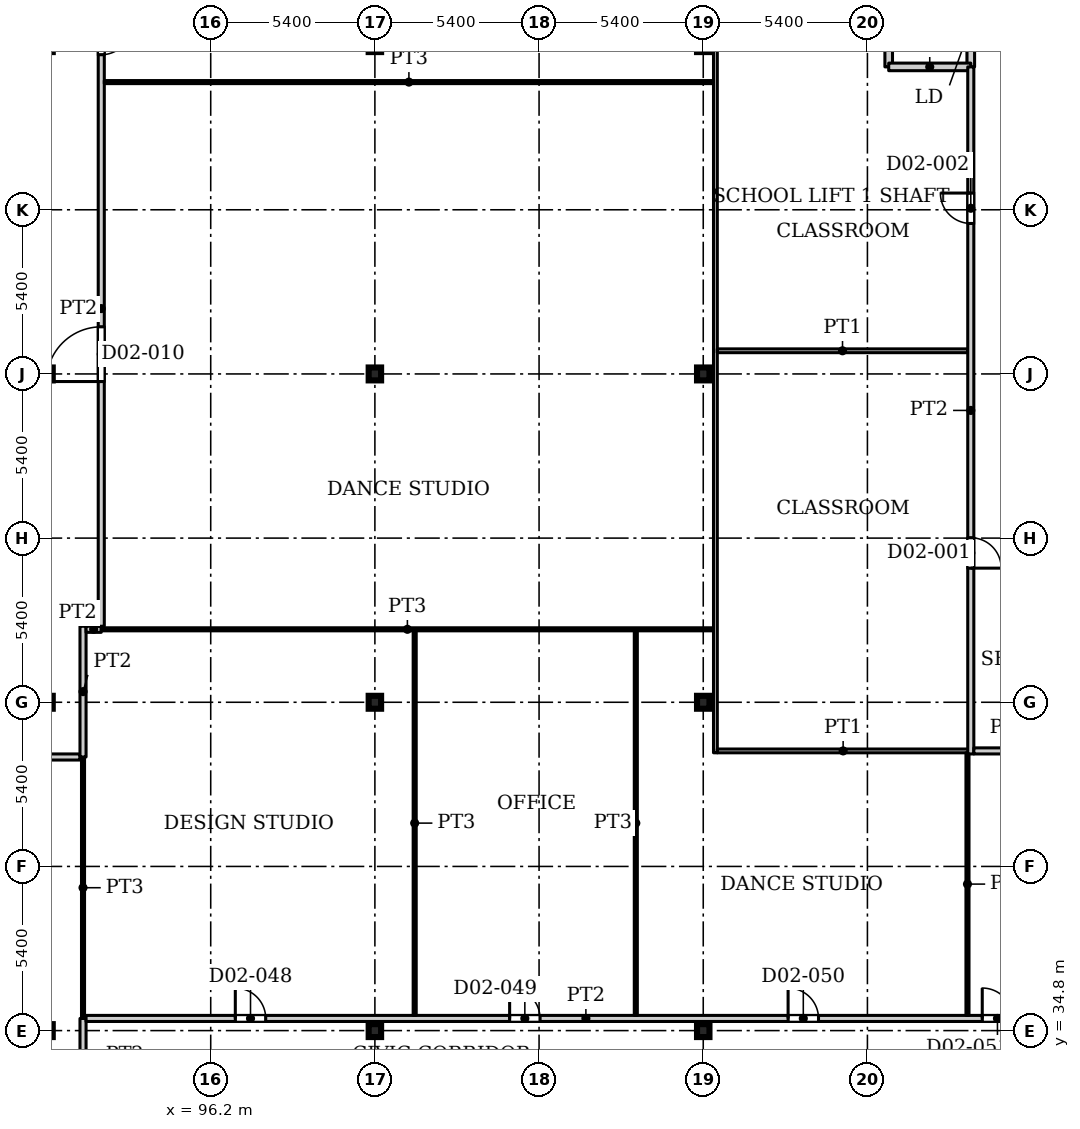
"""IFC4 building model, lengths in metres.
Left out: names, types, materials, properties, quantities, classifications, styles, units other than length and angle.
Written with IfcOpenShell. Run it as: python <this file> out.ifc"""

import sys

from ifc_helpers import new_model, si_unit, direction, frame, frame_2d, origin, origin_2d, place, context, subcontext, project, spatial, rectangle, i_section, extrude, source, transform, mapped, element, fill, save


model = new_model("IFC4")
c1 = context("Model", 3, precision=1e-05, world=origin(), true_north=direction((0.0, 1.0)))
c2 = subcontext(c1, "Body", "Model", "MODEL_VIEW")
j1 = project(units=[si_unit("LENGTHUNIT", "METRE"), si_unit("PLANEANGLEUNIT", "RADIAN")], contexts=[c1])
p1 = place(None, origin())
s1 = spatial("IfcSite", under=j1, at=p1, CompositionType="ELEMENT")
p2 = place(p1, origin())
s2 = spatial("IfcBuilding", under=s1, at=p2, CompositionType="ELEMENT")
p3 = place(p2, frame((0.0, 0.0, 12.5)))
s3 = spatial("IfcBuildingStorey", under=s2, at=p3, CompositionType="ELEMENT", Elevation=12.5)
for number, where, z_axis, x_axis in (
    (1, (90.8, 34.8, 0.0), (0.0, 0.0, 1.0), (1.0, 0.0, 0.0)),
    (2, (101.6, 34.8, 0.0), (0.0, 0.0, 1.0), (1.0, 0.0, 0.0)),
    (3, (112.4, 34.8, 0.0), (0.0, 0.0, 1.0), (1.0, 0.0, 0.0)),
    (4, (90.8, 45.6, 0.0), (0.0, 0.0, 1.0), (1.0, 0.0, 0.0)),
    (5, (101.6, 45.6, 0.0), (0.0, 0.0, 1.0), (1.0, 0.0, 0.0)),
    (6, (112.4, 45.6, 0.0), (0.0, 0.0, 1.0), (1.0, 0.0, 0.0)),
    (7, (90.8, 56.4, 0.0), (0.0, 0.0, 1.0), (1.0, 0.0, 0.0)),
    (8, (101.6, 56.4, 0.0), (0.0, 0.0, 1.0), (1.0, 0.0, 0.0)),
    (9, (112.4, 56.4, 0.0), (0.0, 0.0, 1.0), (1.0, 0.0, 0.0)),
    (10, (90.8, 67.2, 0.0), (0.0, 0.0, 1.0), (1.0, 0.0, 0.0)),
    (11, (101.6, 67.2, 0.0), (0.0, 0.0, 1.0), (1.0, 0.0, 0.0)),
    (12, (112.4, 67.2, 0.0), (0.0, 0.0, 1.0), (1.0, 0.0, 0.0)),
):
    element("IfcColumn", number, at=place(p3, frame(where, z_axis=z_axis, x_axis=x_axis)), inside=s3, PredefinedType="COLUMN", context=c2, shape_type="SweptSolid", body=[
        extrude(i_section(OverallWidth=0.409, OverallDepth=0.425, WebThickness=0.033, FlangeThickness=0.052, FilletRadius=0.013, at=origin_2d()), origin(), (0.0, 0.0, 1.0), 4.5),
    ])
p4 = place(p3, frame((118.5, 66.5, 0.0), z_axis=(0.0, 0.0, 1.0), x_axis=(0.0, 1.0, 0.0)))
e13 = element("IfcWall", 13, at=p4, inside=s3, PredefinedType="PARTITIONING", context=c2, shape_type="SweptSolid", body=[
    extrude(rectangle(XDim=8.1, YDim=0.25, at=frame_2d((4.05, 0.0))), origin(), (0.0, 0.0, 1.0), 4.5),
])
p5 = place(p3, frame((121.2, 66.5, 0.0), z_axis=(0.0, 0.0, 1.0), x_axis=(0.0, 1.0, 0.0)))
e14 = element("IfcWall", 14, at=p5, inside=s3, PredefinedType="PARTITIONING", context=c2, shape_type="SweptSolid", body=[
    extrude(rectangle(XDim=8.1, YDim=0.25, at=frame_2d((4.05, 0.0))), origin(), (0.0, 0.0, 1.0), 4.5),
])
p6 = place(p5, frame((0.8, 0.0, 0.0)))
e15 = element("IfcOpeningElement", 15, at=p6, cuts=e14, PredefinedType="OPENING", context=c2, shape_type="SweptSolid", body=[
    extrude(rectangle(XDim=1.1, YDim=2.2, at=frame_2d((0.55, 1.1))), frame((0.0, 0.135, 0.0), z_axis=(0.0, -1.0, 0.0), x_axis=(1.0, 0.0, 0.0)), (0.0, 0.0, 1.0), 0.27),
])
p7 = place(p5, frame((3.5, 0.0, 0.0)))
e16 = element("IfcOpeningElement", 16, at=p7, cuts=e14, PredefinedType="OPENING", context=c2, shape_type="SweptSolid", body=[
    extrude(rectangle(XDim=1.1, YDim=2.2, at=frame_2d((0.55, 1.1))), frame((0.0, 0.135, 0.0), z_axis=(0.0, -1.0, 0.0), x_axis=(1.0, 0.0, 0.0)), (0.0, 0.0, 1.0), 0.27),
])
p8 = place(p5, frame((6.2, 0.0, 0.0)))
e17 = element("IfcOpeningElement", 17, at=p8, cuts=e14, PredefinedType="OPENING", context=c2, shape_type="SweptSolid", body=[
    extrude(rectangle(XDim=1.1, YDim=2.2, at=frame_2d((0.55, 1.1))), frame((0.0, 0.135, 0.0), z_axis=(0.0, -1.0, 0.0), x_axis=(1.0, 0.0, 0.0)), (0.0, 0.0, 1.0), 0.27),
])
p9 = place(p3, frame((118.5, 66.5, 0.0), z_axis=(0.0, 0.0, 1.0), x_axis=(1.0, 0.0, 0.0)))
e18 = element("IfcWall", 18, at=p9, inside=s3, PredefinedType="PARTITIONING", context=c2, shape_type="SweptSolid", body=[
    extrude(rectangle(XDim=2.7, YDim=0.25, at=frame_2d((1.35, 0.0))), origin(), (0.0, 0.0, 1.0), 4.5),
])
p10 = place(p3, frame((67.5, 43.8, 0.0), z_axis=(0.0, 0.0, 1.0), x_axis=(1.0, 0.0, 0.0)))
e19 = element("IfcWall", 19, at=p10, inside=s3, PredefinedType="PARTITIONING", context=c2, shape_type="SweptSolid", body=[
    extrude(rectangle(XDim=24.4, YDim=0.2, at=frame_2d((12.2, 0.0))), origin(), (0.0, 0.0, 1.0), 4.18),
])
p11 = place(p10, frame((11.3, 0.0, 0.0)))
e20 = element("IfcOpeningElement", 20, at=p11, cuts=e19, PredefinedType="OPENING", context=c2, shape_type="SweptSolid", body=[
    extrude(rectangle(XDim=1.8, YDim=2.1, at=frame_2d((0.9, 1.05))), frame((0.0, 0.11, 0.0), z_axis=(0.0, -1.0, 0.0), x_axis=(1.0, 0.0, 0.0)), (0.0, 0.0, 1.0), 0.22),
])
p12 = place(p3, frame((92.0, 32.8, 0.0), z_axis=(0.0, 0.0, 1.0), x_axis=(0.0, 1.0, 0.0)))
e21 = element("IfcWall", 21, at=p12, inside=s3, PredefinedType="PARTITIONING", context=c2, shape_type="SweptSolid", body=[
    extrude(rectangle(XDim=2.4, YDim=0.2, at=frame_2d((1.2, 0.0))), origin(), (0.0, 0.0, 1.0), 4.18),
])
p13 = place(p3, frame((92.0, 35.2, 0.0), z_axis=(0.0, 0.0, 1.0), x_axis=(0.0, 1.0, 0.0)))
e22 = element("IfcWall", 22, at=p13, inside=s3, PredefinedType="PARTITIONING", context=c2, shape_type="SweptSolid", body=[
    extrude(rectangle(XDim=8.6, YDim=0.1, at=frame_2d((4.3, 0.0))), origin(), (0.0, 0.0, 1.0), 4.18),
])
p14 = place(p3, frame((92.0, 43.8, 0.0), z_axis=(0.0, 0.0, 1.0), x_axis=(0.0, 1.0, 0.0)))
e23 = element("IfcWall", 23, at=p14, inside=s3, PredefinedType="PARTITIONING", context=c2, shape_type="SweptSolid", body=[
    extrude(rectangle(XDim=4.3, YDim=0.2, at=frame_2d((2.15, 0.0))), origin(), (0.0, 0.0, 1.0), 4.18),
])
p15 = place(p3, frame((92.1, 35.2, 0.0), z_axis=(0.0, 0.0, 1.0), x_axis=(1.0, 0.0, 0.0)))
e24 = element("IfcWall", 24, at=p15, inside=s3, PredefinedType="PARTITIONING", context=c2, shape_type="SweptSolid", body=[
    extrude(rectangle(XDim=32.88, YDim=0.2, at=frame_2d((16.44, 0.0))), origin(), (0.0, 0.0, 1.0), 4.18),
])
p16 = place(p15, frame((4.909, 0.0, 0.0)))
e25 = element("IfcOpeningElement", 25, at=p16, cuts=e24, PredefinedType="OPENING", context=c2, shape_type="SweptSolid", body=[
    extrude(rectangle(XDim=1.0, YDim=2.1, at=frame_2d((0.5, 1.05))), frame((0.0, 0.11, 0.0), z_axis=(0.0, -1.0, 0.0), x_axis=(1.0, 0.0, 0.0)), (0.0, 0.0, 1.0), 0.22),
])
p17 = place(p15, frame((13.932, 0.0, 0.0)))
e26 = element("IfcOpeningElement", 26, at=p17, cuts=e24, PredefinedType="OPENING", context=c2, shape_type="SweptSolid", body=[
    extrude(rectangle(XDim=1.0, YDim=2.1, at=frame_2d((0.5, 1.05))), frame((0.0, 0.11, 0.0), z_axis=(0.0, -1.0, 0.0), x_axis=(1.0, 0.0, 0.0)), (0.0, 0.0, 1.0), 0.22),
])
p18 = place(p15, frame((23.091, 0.0, 0.0)))
e27 = element("IfcOpeningElement", 27, at=p18, cuts=e24, PredefinedType="OPENING", context=c2, shape_type="SweptSolid", body=[
    extrude(rectangle(XDim=1.0, YDim=2.1, at=frame_2d((0.5, 1.05))), frame((0.0, 0.11, 0.0), z_axis=(0.0, -1.0, 0.0), x_axis=(1.0, 0.0, 0.0)), (0.0, 0.0, 1.0), 0.22),
])
p19 = place(p15, frame((29.477, 0.0, 0.0)))
e28 = element("IfcOpeningElement", 28, at=p19, cuts=e24, PredefinedType="OPENING", context=c2, shape_type="SweptSolid", body=[
    extrude(rectangle(XDim=1.0, YDim=2.1, at=frame_2d((0.5, 1.05))), frame((0.0, 0.11, 0.0), z_axis=(0.0, -1.0, 0.0), x_axis=(1.0, 0.0, 0.0)), (0.0, 0.0, 1.0), 0.22),
])
p20 = place(p3, frame((92.1, 48.0, 0.0), z_axis=(0.0, 0.0, 1.0), x_axis=(1.0, 0.0, 0.0)))
e29 = element("IfcWall", 29, at=p20, inside=s3, PredefinedType="PARTITIONING", context=c2, shape_type="SweptSolid", body=[
    extrude(rectangle(XDim=0.5, YDim=0.2, at=frame_2d((0.25, 0.0))), origin(), (0.0, 0.0, 1.0), 4.18),
])
p21 = place(p3, frame((92.6, 48.0, 0.0), z_axis=(0.0, 0.0, 1.0), x_axis=(1.0, 0.0, 0.0)))
e30 = element("IfcWall", 30, at=p21, inside=s3, PredefinedType="PARTITIONING", context=c2, shape_type="SweptSolid", body=[
    extrude(rectangle(XDim=20.138, YDim=0.1, at=frame_2d((10.069, 0.0))), origin(), (0.0, 0.0, 1.0), 4.18),
])
p22 = place(p3, frame((92.6, 48.1, 0.0), z_axis=(0.0, 0.0, 1.0), x_axis=(0.0, 1.0, 0.0)))
e31 = element("IfcWall", 31, at=p22, inside=s3, PredefinedType="PARTITIONING", context=c2, shape_type="SweptSolid", body=[
    extrude(rectangle(XDim=20.9, YDim=0.2, at=frame_2d((10.45, 0.0))), origin(), (0.0, 0.0, 1.0), 4.18),
])
p23 = place(p22, frame((8.05, 0.0, 0.0)))
e32 = element("IfcOpeningElement", 32, at=p23, cuts=e31, PredefinedType="OPENING", context=c2, shape_type="SweptSolid", body=[
    extrude(rectangle(XDim=1.8, YDim=2.1, at=frame_2d((0.9, 1.05))), frame((0.0, 0.11, 0.0), z_axis=(0.0, -1.0, 0.0), x_axis=(1.0, 0.0, 0.0)), (0.0, 0.0, 1.0), 0.22),
])
p24 = place(p22, frame((18.8, 0.0, 0.0)))
e33 = element("IfcOpeningElement", 33, at=p24, cuts=e31, PredefinedType="OPENING", context=c2, shape_type="SweptSolid", body=[
    extrude(rectangle(XDim=1.0, YDim=2.1, at=frame_2d((0.5, 1.05))), frame((0.0, 0.11, 0.0), z_axis=(0.0, -1.0, 0.0), x_axis=(1.0, 0.0, 0.0)), (0.0, 0.0, 1.0), 0.22),
])
p25 = place(p3, frame((92.7, 66.0, 0.0), z_axis=(0.0, 0.0, 1.0), x_axis=(1.0, 0.0, 0.0)))
e34 = element("IfcWall", 34, at=p25, inside=s3, PredefinedType="PARTITIONING", context=c2, shape_type="SweptSolid", body=[
    extrude(rectangle(XDim=20.038, YDim=0.1, at=frame_2d((10.019, 0.0))), origin(), (0.0, 0.0, 1.0), 4.18),
])
for number, where, z_axis, x_axis in (
    (35, (102.909, 35.3, 0.0), (0.0, 0.0, 1.0), (0.0, 1.0, 0.0)),
    (36, (110.182, 35.3, 0.0), (0.0, 0.0, 1.0), (0.0, 1.0, 0.0)),
):
    element("IfcWall", number, at=place(p3, frame(where, z_axis=z_axis, x_axis=x_axis)), inside=s3, PredefinedType="PARTITIONING", context=c2, shape_type="SweptSolid", body=[
        extrude(rectangle(XDim=12.65, YDim=0.1, at=frame_2d((6.325, 0.0))), origin(), (0.0, 0.0, 1.0), 4.18),
    ])
p26 = place(p3, frame((112.8, 43.938, 0.0), z_axis=(0.0, 0.0, 1.0), x_axis=(0.0, 1.0, 0.0)))
e37 = element("IfcWall", 37, at=p26, inside=s3, PredefinedType="PARTITIONING", context=c2, shape_type="SweptSolid", body=[
    extrude(rectangle(XDim=46.787, YDim=0.125, at=frame_2d((23.394, 0.0))), origin(), (0.0, 0.0, 1.0), 4.18),
])
p27 = place(p3, frame((112.862, 44.0, 0.0), z_axis=(0.0, 0.0, 1.0), x_axis=(1.0, 0.0, 0.0)))
e38 = element("IfcWall", 38, at=p27, inside=s3, PredefinedType="PARTITIONING", context=c2, shape_type="SweptSolid", body=[
    extrude(rectangle(XDim=8.279, YDim=0.125, at=frame_2d((4.14, 0.0))), origin(), (0.0, 0.0, 1.0), 4.18),
])
p28 = place(p3, frame((112.862, 57.162, 0.0), z_axis=(0.0, 0.0, 1.0), x_axis=(1.0, 0.0, 0.0)))
e39 = element("IfcWall", 39, at=p28, inside=s3, PredefinedType="PARTITIONING", context=c2, shape_type="SweptSolid", body=[
    extrude(rectangle(XDim=8.238, YDim=0.125, at=frame_2d((4.119, 0.0))), origin(), (0.0, 0.0, 1.0), 4.18),
])
p29 = place(p3, frame((121.091, 35.3, 0.0), z_axis=(0.0, 0.0, 1.0), x_axis=(0.0, 1.0, 0.0)))
e40 = element("IfcWall", 40, at=p29, inside=s3, PredefinedType="PARTITIONING", context=c2, shape_type="SweptSolid", body=[
    extrude(rectangle(XDim=8.638, YDim=0.1, at=frame_2d((4.319, 0.0))), origin(), (0.0, 0.0, 1.0), 4.18),
])
p30 = place(p3, frame((121.2, 43.9, 0.0), z_axis=(0.0, 0.0, 1.0), x_axis=(0.0, 1.0, 0.0)))
e41 = element("IfcWall", 41, at=p30, inside=s3, PredefinedType="PARTITIONING", context=c2, shape_type="SweptSolid", body=[
    extrude(rectangle(XDim=22.6, YDim=0.2, at=frame_2d((11.3, 0.0))), origin(), (0.0, 0.0, 1.0), 4.18),
])
p31 = place(p30, frame((6.112, 0.0, 0.0)))
e42 = element("IfcOpeningElement", 42, at=p31, cuts=e41, PredefinedType="OPENING", context=c2, shape_type="SweptSolid", body=[
    extrude(rectangle(XDim=1.0, YDim=2.1, at=frame_2d((0.5, 1.05))), frame((0.0, 0.11, 0.0), z_axis=(0.0, -1.0, 0.0), x_axis=(1.0, 0.0, 0.0)), (0.0, 0.0, 1.0), 0.22),
])
p32 = place(p30, frame((17.45, 0.0, 0.0)))
e43 = element("IfcOpeningElement", 43, at=p32, cuts=e41, PredefinedType="OPENING", context=c2, shape_type="SweptSolid", body=[
    extrude(rectangle(XDim=1.0, YDim=2.1, at=frame_2d((0.5, 1.05))), frame((0.0, 0.11, 0.0), z_axis=(0.0, -1.0, 0.0), x_axis=(1.0, 0.0, 0.0)), (0.0, 0.0, 1.0), 0.22),
])
p33 = place(p3, frame((121.3, 44.0, 0.0), z_axis=(0.0, 0.0, 1.0), x_axis=(1.0, 0.0, 0.0)))
e44 = element("IfcWall", 44, at=p33, inside=s3, PredefinedType="PARTITIONING", context=c2, shape_type="SweptSolid", body=[
    extrude(rectangle(XDim=2.3, YDim=0.2, at=frame_2d((1.15, 0.0))), origin(), (0.0, 0.0, 1.0), 4.18),
])
m1 = source(origin(), c2, "Body", "SweptSolid", [
    extrude(rectangle(XDim=1.0, YDim=2.1, at=frame_2d((0.5, 1.05))), frame((0.0, 0.025, 0.0), z_axis=(0.0, -1.0, 0.0), x_axis=(1.0, 0.0, 0.0)), (0.0, 0.0, 1.0), 0.05),
])
p34 = place(p31, origin())
e45 = element("IfcDoor", 45, at=p34, inside=s3, OperationType="SINGLE_SWING_RIGHT", PredefinedType="DOOR", context=c2, shape_type="MappedRepresentation", body=[
    mapped(m1, transform((0.0, 0.0, 0.0), x_axis=(1.0, 0.0, 0.0), y_axis=(0.0, 1.0, 0.0), z_axis=(0.0, 0.0, 1.0), scale=1.0)),
])
fill(e42, e45)
p35 = place(p32, origin())
e46 = element("IfcDoor", 46, at=p35, inside=s3, OperationType="SINGLE_SWING_LEFT", PredefinedType="DOOR", context=c2, shape_type="MappedRepresentation", body=[
    mapped(m1, transform((0.0, 0.0, 0.0), x_axis=(1.0, 0.0, 0.0), y_axis=(0.0, 1.0, 0.0), z_axis=(0.0, 0.0, 1.0), scale=1.0)),
])
fill(e43, e46)
m2 = source(origin(), c2, "Body", "SweptSolid", [
    extrude(rectangle(XDim=1.8, YDim=2.1, at=frame_2d((0.9, 1.05))), frame((0.0, 0.025, 0.0), z_axis=(0.0, -1.0, 0.0), x_axis=(1.0, 0.0, 0.0)), (0.0, 0.0, 1.0), 0.05),
])
p36 = place(p23, origin())
e47 = element("IfcDoor", 47, at=p36, inside=s3, OperationType="DOUBLE_DOOR_SINGLE_SWING", PredefinedType="DOOR", context=c2, shape_type="MappedRepresentation", body=[
    mapped(m2, transform((0.0, 0.0, 0.0), x_axis=(1.0, 0.0, 0.0), y_axis=(0.0, 1.0, 0.0), z_axis=(0.0, 0.0, 1.0), scale=1.0)),
])
fill(e32, e47)
p37 = place(p24, origin())
e48 = element("IfcDoor", 48, at=p37, inside=s3, OperationType="SINGLE_SWING_RIGHT", PredefinedType="DOOR", context=c2, shape_type="MappedRepresentation", body=[
    mapped(m1, transform((0.0, 0.0, 0.0), x_axis=(1.0, 0.0, 0.0), y_axis=(0.0, 1.0, 0.0), z_axis=(0.0, 0.0, 1.0), scale=1.0)),
])
fill(e33, e48)
p38 = place(p16, origin())
e49 = element("IfcDoor", 49, at=p38, inside=s3, OperationType="SINGLE_SWING_LEFT", PredefinedType="DOOR", context=c2, shape_type="MappedRepresentation", body=[
    mapped(m1, transform((0.0, 0.0, 0.0), x_axis=(1.0, 0.0, 0.0), y_axis=(0.0, 1.0, 0.0), z_axis=(0.0, 0.0, 1.0), scale=1.0)),
])
fill(e25, e49)
p39 = place(p17, origin())
e50 = element("IfcDoor", 50, at=p39, inside=s3, OperationType="SINGLE_SWING_LEFT", PredefinedType="DOOR", context=c2, shape_type="MappedRepresentation", body=[
    mapped(m1, transform((0.0, 0.0, 0.0), x_axis=(1.0, 0.0, 0.0), y_axis=(0.0, 1.0, 0.0), z_axis=(0.0, 0.0, 1.0), scale=1.0)),
])
fill(e26, e50)
p40 = place(p18, origin())
e51 = element("IfcDoor", 51, at=p40, inside=s3, OperationType="SINGLE_SWING_LEFT", PredefinedType="DOOR", context=c2, shape_type="MappedRepresentation", body=[
    mapped(m1, transform((0.0, 0.0, 0.0), x_axis=(1.0, 0.0, 0.0), y_axis=(0.0, 1.0, 0.0), z_axis=(0.0, 0.0, 1.0), scale=1.0)),
])
fill(e27, e51)
p41 = place(p19, origin())
e52 = element("IfcDoor", 52, at=p41, inside=s3, OperationType="SINGLE_SWING_LEFT", PredefinedType="DOOR", context=c2, shape_type="MappedRepresentation", body=[
    mapped(m1, transform((0.0, 0.0, 0.0), x_axis=(1.0, 0.0, 0.0), y_axis=(0.0, 1.0, 0.0), z_axis=(0.0, 0.0, 1.0), scale=1.0)),
])
fill(e28, e52)
save(model, sys.argv[1])
